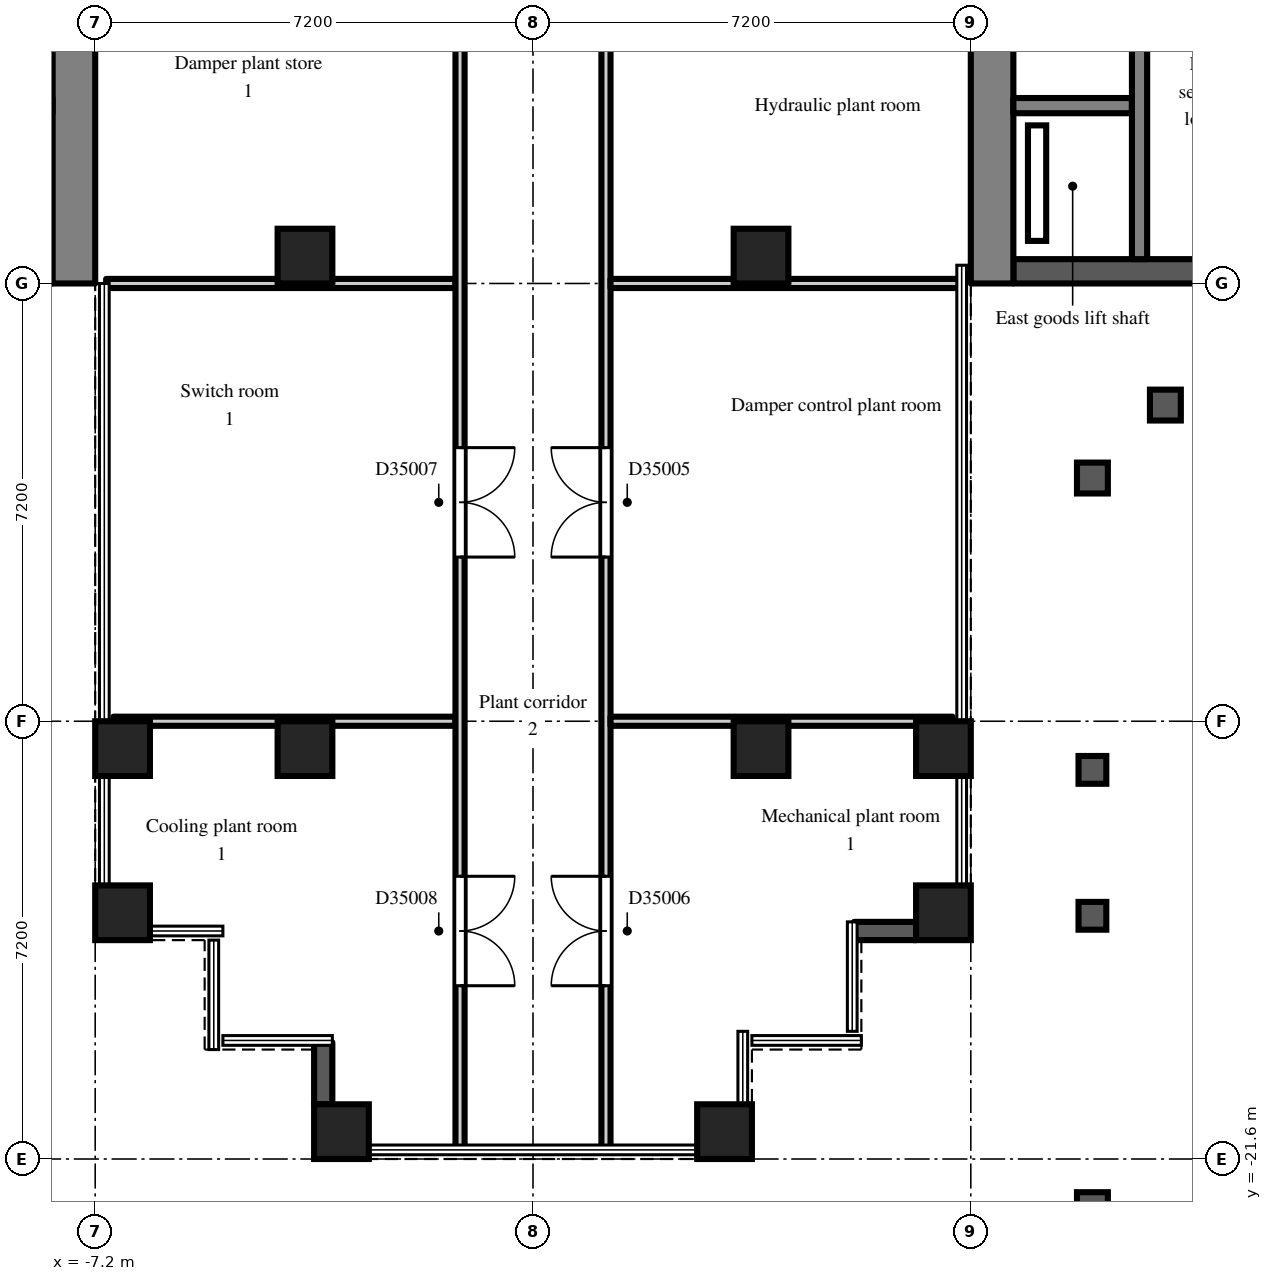
"""IFC4 building model, lengths in metres.
Left out: names, types, materials, properties, quantities, classifications, styles, units other than length and angle.
Written with IfcOpenShell. Run it as: python <this file> out.ifc"""

import sys

from ifc_helpers import new_model, si_unit, direction, frame, frame_2d, origin, origin_2d, place, context, subcontext, project, spatial, rectangle, extrude, element, fill, save


model = new_model("IFC4")
c1 = context("Model", 3, precision=1e-05, world=origin(), true_north=direction((0.0, 1.0)))
c2 = subcontext(c1, "Body", "Model", "MODEL_VIEW")
j1 = project(units=[si_unit("LENGTHUNIT", "METRE"), si_unit("PLANEANGLEUNIT", "RADIAN")], contexts=[c1])
p1 = place(None, origin())
s1 = spatial("IfcSite", under=j1, at=p1, CompositionType="ELEMENT")
p2 = place(p1, origin())
s2 = spatial("IfcBuilding", under=s1, at=p2, CompositionType="ELEMENT")
p3 = place(p2, frame((0.0, 0.0, 242.1)))
s3 = spatial("IfcBuildingStorey", under=s2, at=p3, CompositionType="ELEMENT", Elevation=242.1)
for number, where, z_axis, x_axis in (
    (1, (-6.75, -17.55, 0.0), (0.0, 0.0, 1.0), (1.0, 0.0, 0.0)),
    (2, (-6.75, -14.85, 0.0), (0.0, 0.0, 1.0), (1.0, 0.0, 0.0)),
    (3, (-3.75, -14.85, 0.0), (0.0, 0.0, 1.0), (1.0, 0.0, 0.0)),
    (4, (-3.75, -6.75, 0.0), (0.0, 0.0, 1.0), (1.0, 0.0, 0.0)),
    (5, (-3.15, -21.15, 0.0), (0.0, 0.0, 1.0), (1.0, 0.0, 0.0)),
    (6, (3.15, -21.15, 0.0), (0.0, 0.0, 1.0), (1.0, 0.0, 0.0)),
    (7, (3.75, -14.85, 0.0), (0.0, 0.0, 1.0), (1.0, 0.0, 0.0)),
    (8, (3.75, -6.75, 0.0), (0.0, 0.0, 1.0), (1.0, 0.0, 0.0)),
    (9, (6.75, -17.55, 0.0), (0.0, 0.0, 1.0), (1.0, 0.0, 0.0)),
    (10, (6.75, -14.85, 0.0), (0.0, 0.0, 1.0), (1.0, 0.0, 0.0)),
):
    element("IfcColumn", number, at=place(p3, frame(where, z_axis=z_axis, x_axis=x_axis)), inside=s3, PredefinedType="COLUMN", context=c2, shape_type="SweptSolid", body=[
        extrude(rectangle(XDim=0.9, YDim=0.9, at=origin_2d()), origin(), (0.0, 0.0, 1.0), 5.4),
    ])
for number, where, z_axis, x_axis in (
    (11, (-3.45, -19.68, 0.0), (0.0, 0.0, 1.0), (0.0, -1.0, 0.0)),
    (12, (5.28, -17.85, 0.0), (0.0, 0.0, 1.0), (1.0, 0.0, 0.0)),
):
    element("IfcWall", number, at=place(p3, frame(where, z_axis=z_axis, x_axis=x_axis)), inside=s3, PredefinedType="SOLIDWALL", context=c2, shape_type="SweptSolid", body=[
        extrude(rectangle(XDim=1.02, YDim=0.3, at=frame_2d((0.51, 0.0))), origin(), (0.0, 0.0, 1.0), 4.95),
    ])
p4 = place(p3, frame((7.55, -7.2, 0.0), z_axis=(0.0, 0.0, 1.0), x_axis=(0.0, 1.0, 0.0)))
e13 = element("IfcWall", 13, at=p4, inside=s3, PredefinedType="SHEAR", context=c2, shape_type="SweptSolid", body=[
    extrude(rectangle(XDim=14.4, YDim=0.7, at=frame_2d((7.2, 0.0))), origin(), (0.0, 0.0, 1.0), 4.95),
])
p5 = place(p4, frame((6.0, 0.0, 0.0)))
e14 = element("IfcOpeningElement", 14, at=p5, cuts=e13, PredefinedType="OPENING", context=c2, shape_type="SweptSolid", body=[
    extrude(rectangle(XDim=2.4, YDim=2.2, at=frame_2d((1.2, 1.1))), frame((0.0, 0.36, 0.0), z_axis=(0.0, -1.0, 0.0), x_axis=(1.0, 0.0, 0.0)), (0.0, 0.0, 1.0), 0.72),
])
p6 = place(p3, frame((7.9, -7.0, 0.0), z_axis=(0.0, 0.0, 1.0), x_axis=(1.0, 0.0, 0.0)))
e15 = element("IfcWall", 15, at=p6, inside=s3, PredefinedType="SHEAR", context=c2, shape_type="SweptSolid", body=[
    extrude(rectangle(XDim=12.95, YDim=0.4, at=frame_2d((6.475, 0.0))), origin(), (0.0, 0.0, 1.0), 4.95),
])
p7 = place(p3, frame((7.9, -4.275, 0.0), z_axis=(0.0, 0.0, 1.0), x_axis=(1.0, 0.0, 0.0)))
e16 = element("IfcWall", 16, at=p7, inside=s3, PredefinedType="SHEAR", context=c2, shape_type="SweptSolid", body=[
    extrude(rectangle(XDim=1.95, YDim=0.25, at=frame_2d((0.975, 0.0))), origin(), (0.0, 0.0, 1.0), 4.95),
])
p8 = place(p3, frame((9.975, -2.05, 0.0), z_axis=(0.0, 0.0, 1.0), x_axis=(0.0, -1.0, 0.0)))
e17 = element("IfcWall", 17, at=p8, inside=s3, PredefinedType="SHEAR", context=c2, shape_type="SweptSolid", body=[
    extrude(rectangle(XDim=4.75, YDim=0.25, at=frame_2d((2.375, 0.0))), origin(), (0.0, 0.0, 1.0), 4.95),
])
p9 = place(p3, frame((-7.55, -7.2, 0.0), z_axis=(0.0, 0.0, 1.0), x_axis=(0.0, 1.0, 0.0)))
e18 = element("IfcWall", 18, at=p9, inside=s3, PredefinedType="SHEAR", context=c2, shape_type="SweptSolid", body=[
    extrude(rectangle(XDim=14.4, YDim=0.7, at=frame_2d((7.2, 0.0))), origin(), (0.0, 0.0, 1.0), 4.95),
])
p10 = place(p9, frame((6.0, 0.0, 0.0)))
e19 = element("IfcOpeningElement", 19, at=p10, cuts=e18, PredefinedType="OPENING", context=c2, shape_type="SweptSolid", body=[
    extrude(rectangle(XDim=2.4, YDim=2.2, at=frame_2d((1.2, 1.1))), frame((0.0, 0.36, 0.0), z_axis=(0.0, -1.0, 0.0), x_axis=(1.0, 0.0, 0.0)), (0.0, 0.0, 1.0), 0.72),
])
p11 = place(p3, frame((-6.9, -14.4, 0.0), z_axis=(0.0, 0.0, 1.0), x_axis=(1.0, 0.0, 0.0)))
e20 = element("IfcWall", 20, at=p11, inside=s3, PredefinedType="PARTITIONING", context=c2, shape_type="SweptSolid", body=[
    extrude(rectangle(XDim=5.625, YDim=0.15, at=frame_2d((2.812, 0.0))), origin(), (0.0, 0.0, 1.0), 4.95),
])
p12 = place(p3, frame((-7.02, -7.2, 0.0), z_axis=(0.0, 0.0, 1.0), x_axis=(1.0, 0.0, 0.0)))
e21 = element("IfcWall", 21, at=p12, inside=s3, PredefinedType="PARTITIONING", context=c2, shape_type="SweptSolid", body=[
    extrude(rectangle(XDim=5.745, YDim=0.15, at=frame_2d((2.873, 0.0))), origin(), (0.0, 0.0, 1.0), 4.95),
])
p13 = place(p3, frame((-1.2, -21.42, 0.0), z_axis=(0.0, 0.0, 1.0), x_axis=(0.0, 1.0, 0.0)))
e22 = element("IfcWall", 22, at=p13, inside=s3, PredefinedType="PARTITIONING", context=c2, shape_type="SweptSolid", body=[
    extrude(rectangle(XDim=20.145, YDim=0.15, at=frame_2d((10.073, 0.0))), origin(), (0.0, 0.0, 1.0), 4.95),
])
p14 = place(p13, frame((9.72, 0.0, 0.0)))
e23 = element("IfcOpeningElement", 23, at=p14, cuts=e22, PredefinedType="OPENING", context=c2, shape_type="SweptSolid", body=[
    extrude(rectangle(XDim=1.8, YDim=2.1, at=frame_2d((0.9, 1.05))), frame((0.0, 0.085, 0.0), z_axis=(0.0, -1.0, 0.0), x_axis=(1.0, 0.0, 0.0)), (0.0, 0.0, 1.0), 0.17),
])
p15 = place(p13, frame((2.67, 0.0, 0.0)))
e24 = element("IfcOpeningElement", 24, at=p15, cuts=e22, PredefinedType="OPENING", context=c2, shape_type="SweptSolid", body=[
    extrude(rectangle(XDim=1.8, YDim=2.1, at=frame_2d((0.9, 1.05))), frame((0.0, 0.085, 0.0), z_axis=(0.0, -1.0, 0.0), x_axis=(1.0, 0.0, 0.0)), (0.0, 0.0, 1.0), 0.17),
])
p16 = place(p3, frame((1.2, -21.42, 0.0), z_axis=(0.0, 0.0, 1.0), x_axis=(0.0, 1.0, 0.0)))
e25 = element("IfcWall", 25, at=p16, inside=s3, PredefinedType="PARTITIONING", context=c2, shape_type="SweptSolid", body=[
    extrude(rectangle(XDim=20.295, YDim=0.15, at=frame_2d((10.147, 0.0))), origin(), (0.0, 0.0, 1.0), 4.95),
])
p17 = place(p16, frame((9.72, 0.0, 0.0)))
e26 = element("IfcOpeningElement", 26, at=p17, cuts=e25, PredefinedType="OPENING", context=c2, shape_type="SweptSolid", body=[
    extrude(rectangle(XDim=1.8, YDim=2.1, at=frame_2d((0.9, 1.05))), frame((0.0, 0.085, 0.0), z_axis=(0.0, -1.0, 0.0), x_axis=(1.0, 0.0, 0.0)), (0.0, 0.0, 1.0), 0.17),
])
p18 = place(p16, frame((2.67, 0.0, 0.0)))
e27 = element("IfcOpeningElement", 27, at=p18, cuts=e25, PredefinedType="OPENING", context=c2, shape_type="SweptSolid", body=[
    extrude(rectangle(XDim=1.8, YDim=2.1, at=frame_2d((0.9, 1.05))), frame((0.0, 0.085, 0.0), z_axis=(0.0, -1.0, 0.0), x_axis=(1.0, 0.0, 0.0)), (0.0, 0.0, 1.0), 0.17),
])
p19 = place(p3, frame((1.275, -14.4, 0.0), z_axis=(0.0, 0.0, 1.0), x_axis=(1.0, 0.0, 0.0)))
e28 = element("IfcWall", 28, at=p19, inside=s3, PredefinedType="PARTITIONING", context=c2, shape_type="SweptSolid", body=[
    extrude(rectangle(XDim=5.625, YDim=0.15, at=frame_2d((2.812, 0.0))), origin(), (0.0, 0.0, 1.0), 4.95),
])
p20 = place(p3, frame((1.275, -7.2, 0.0), z_axis=(0.0, 0.0, 1.0), x_axis=(1.0, 0.0, 0.0)))
e29 = element("IfcWall", 29, at=p20, inside=s3, PredefinedType="PARTITIONING", context=c2, shape_type="SweptSolid", body=[
    extrude(rectangle(XDim=5.745, YDim=0.15, at=frame_2d((2.873, 0.0))), origin(), (0.0, 0.0, 1.0), 4.95),
])
p21 = place(p17, origin())
e30 = element("IfcDoor", 30, at=p21, inside=s3, OperationType="DOUBLE_DOOR_DOUBLE_SWING", PredefinedType="DOOR", context=c2, shape_type="SweptSolid", body=[
    extrude(rectangle(XDim=1.8, YDim=2.1, at=frame_2d((0.9, 1.05))), frame((0.0, 0.025, 0.0), z_axis=(0.0, -1.0, 0.0), x_axis=(1.0, 0.0, 0.0)), (0.0, 0.0, 1.0), 0.05),
])
fill(e26, e30)
p22 = place(p18, origin())
e31 = element("IfcDoor", 31, at=p22, inside=s3, OperationType="DOUBLE_DOOR_DOUBLE_SWING", PredefinedType="DOOR", context=c2, shape_type="SweptSolid", body=[
    extrude(rectangle(XDim=1.8, YDim=2.1, at=frame_2d((0.9, 1.05))), frame((0.0, 0.025, 0.0), z_axis=(0.0, -1.0, 0.0), x_axis=(1.0, 0.0, 0.0)), (0.0, 0.0, 1.0), 0.05),
])
fill(e27, e31)
p23 = place(p14, frame((1.8, 0.0, 0.0), z_axis=(0.0, 0.0, 1.0), x_axis=(-1.0, 0.0, 0.0)))
e32 = element("IfcDoor", 32, at=p23, inside=s3, OperationType="DOUBLE_DOOR_DOUBLE_SWING", PredefinedType="DOOR", context=c2, shape_type="SweptSolid", body=[
    extrude(rectangle(XDim=1.8, YDim=2.1, at=frame_2d((0.9, 1.05))), frame((0.0, 0.025, 0.0), z_axis=(0.0, -1.0, 0.0), x_axis=(1.0, 0.0, 0.0)), (0.0, 0.0, 1.0), 0.05),
])
fill(e23, e32)
p24 = place(p15, frame((1.8, 0.0, 0.0), z_axis=(0.0, 0.0, 1.0), x_axis=(-1.0, 0.0, 0.0)))
e33 = element("IfcDoor", 33, at=p24, inside=s3, OperationType="DOUBLE_DOOR_DOUBLE_SWING", PredefinedType="DOOR", context=c2, shape_type="SweptSolid", body=[
    extrude(rectangle(XDim=1.8, YDim=2.1, at=frame_2d((0.9, 1.05))), frame((0.0, 0.025, 0.0), z_axis=(0.0, -1.0, 0.0), x_axis=(1.0, 0.0, 0.0)), (0.0, 0.0, 1.0), 0.05),
])
fill(e24, e33)
save(model, sys.argv[1])
